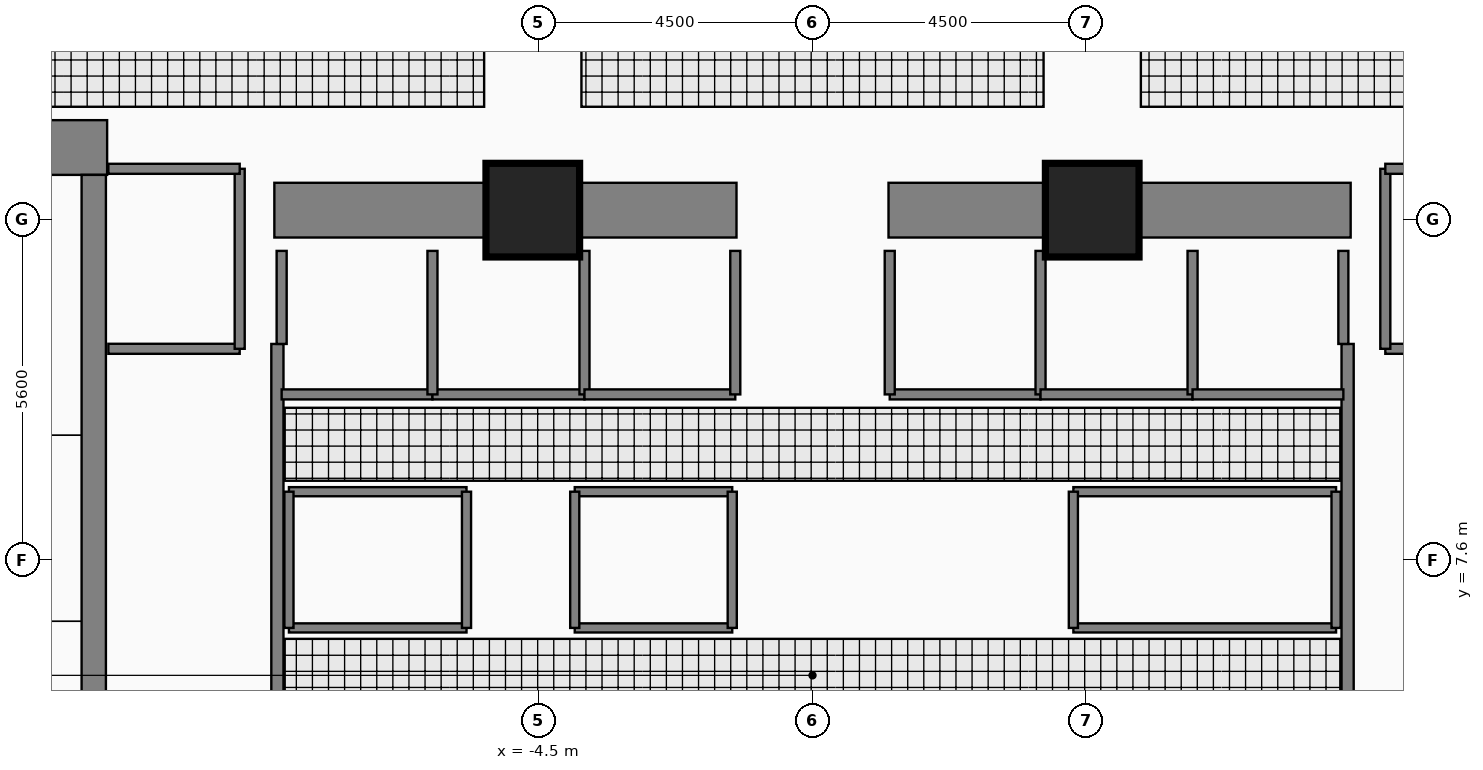
"""IFC4 building model, lengths in metres.
Left out: names, types, materials, properties, quantities, classifications, styles, units other than length and angle.
Written with IfcOpenShell. Run it as: python <this file> out.ifc"""

import sys

from ifc_helpers import new_model, si_unit, direction, frame, frame_2d, origin, origin_2d, place, context, subcontext, project, spatial, rectangle, extrude, element, fill, save


model = new_model("IFC4")
c1 = context("Model", 3, precision=1e-05, world=origin(), true_north=direction((0.0, 1.0)))
c2 = subcontext(c1, "Body", "Model", "MODEL_VIEW")
j1 = project(units=[si_unit("LENGTHUNIT", "METRE"), si_unit("PLANEANGLEUNIT", "RADIAN")], contexts=[c1])
p1 = place(None, origin())
s1 = spatial("IfcSite", under=j1, at=p1, CompositionType="ELEMENT")
p2 = place(p1, origin())
s2 = spatial("IfcBuilding", under=s1, at=p2, CompositionType="ELEMENT")
p3 = place(p2, frame((0.0, 0.0, 27.6)))
s3 = spatial("IfcBuildingStorey", under=s2, at=p3, CompositionType="ELEMENT", Elevation=27.6)
p4 = place(p3, frame((-16.31, 14.38, 0.0), z_axis=(0.0, 0.0, 1.0), x_axis=(1.0, 0.0, 0.0)))
e1 = element("IfcWall", 1, at=p4, inside=s3, PredefinedType="SHEAR", context=c2, shape_type="SweptSolid", body=[
    extrude(rectangle(XDim=4.71, YDim=0.9, at=frame_2d((2.355, 0.0))), origin(), (0.0, 0.0, 1.0), 3.46),
])
for number, where, z_axis, x_axis in (
    (2, (-8.85, 13.35, 0.0), (0.0, 0.0, 1.0), (1.0, 0.0, 0.0)),
    (3, (1.25, 13.35, 0.0), (0.0, 0.0, 1.0), (1.0, 0.0, 0.0)),
):
    element("IfcWall", number, at=place(p3, frame(where, z_axis=z_axis, x_axis=x_axis)), inside=s3, PredefinedType="SHEAR", context=c2, shape_type="SweptSolid", body=[
        extrude(rectangle(XDim=7.6, YDim=0.9, at=frame_2d((3.8, 0.0))), origin(), (0.0, 0.0, 1.0), 3.43),
    ])
p5 = place(p3, frame((-11.82, 4.97, 0.0), z_axis=(0.0, 0.0, 1.0), x_axis=(0.0, 1.0, 0.0)))
e4 = element("IfcWall", 4, at=p5, inside=s3, PredefinedType="SHEAR", context=c2, shape_type="SweptSolid", body=[
    extrude(rectangle(XDim=8.96, YDim=0.4, at=frame_2d((4.48, 0.0))), origin(), (0.0, 0.0, 1.0), 3.46),
])
p6 = place(p5, frame((0.31, 0.0, 0.0)))
e5 = element("IfcOpeningElement", 5, at=p6, cuts=e4, PredefinedType="OPENING", context=c2, shape_type="SweptSolid", body=[
    extrude(rectangle(XDim=1.12, YDim=2.22, at=frame_2d((0.56, 1.11))), frame((0.0, 0.21, 0.0), z_axis=(0.0, -1.0, 0.0), x_axis=(1.0, 0.0, 0.0)), (0.0, 0.0, 1.0), 0.42),
])
for number, where, z_axis, x_axis in (
    (6, (-4.6, 13.35, 0.0), (0.0, 0.0, 1.0), (1.0, 0.0, 0.0)),
    (7, (4.6, 13.35, 0.0), (0.0, 0.0, 1.0), (1.0, 0.0, 0.0)),
):
    element("IfcColumn", number, at=place(p3, frame(where, z_axis=z_axis, x_axis=x_axis)), inside=s3, PredefinedType="COLUMN", context=c2, shape_type="SweptSolid", body=[
        extrude(rectangle(XDim=1.5, YDim=1.5, at=origin_2d()), origin(), (0.0, 0.0, 1.0), 3.65),
    ])
p7 = place(p3, frame((-8.8, 5.05, 0.0), z_axis=(0.0, 0.0, 1.0), x_axis=(0.0, 1.0, 0.0)))
e8 = element("IfcWall", 8, at=p7, inside=s3, PredefinedType="PARTITIONING", context=c2, shape_type="SweptSolid", body=[
    extrude(rectangle(XDim=6.1, YDim=0.2, at=frame_2d((3.05, 0.0))), origin(), (0.0, 0.0, 1.0), 3.43),
])
p8 = place(p7, frame((0.25, 0.0, 0.0)))
e9 = element("IfcOpeningElement", 9, at=p8, cuts=e8, PredefinedType="OPENING", context=c2, shape_type="SweptSolid", body=[
    extrude(rectangle(XDim=1.1, YDim=2.2, at=frame_2d((0.55, 1.1))), frame((0.0, 0.11, 0.0), z_axis=(0.0, -1.0, 0.0), x_axis=(1.0, 0.0, 0.0)), (0.0, 0.0, 1.0), 0.22),
])
p9 = place(p7, frame((3.85, 0.0, 0.0)))
e10 = element("IfcOpeningElement", 10, at=p9, cuts=e8, PredefinedType="OPENING", context=c2, shape_type="SweptSolid", body=[
    extrude(rectangle(XDim=1.1, YDim=2.2, at=frame_2d((0.55, 1.1))), frame((0.0, 0.11, 0.0), z_axis=(0.0, -1.0, 0.0), x_axis=(1.0, 0.0, 0.0)), (0.0, 0.0, 1.0), 0.22),
])
p10 = place(p3, frame((8.8, 11.15, 0.0), z_axis=(0.0, 0.0, 1.0), x_axis=(0.0, -1.0, 0.0)))
e11 = element("IfcWall", 11, at=p10, inside=s3, PredefinedType="PARTITIONING", context=c2, shape_type="SweptSolid", body=[
    extrude(rectangle(XDim=6.1, YDim=0.2, at=frame_2d((3.05, 0.0))), origin(), (0.0, 0.0, 1.0), 3.43),
])
p11 = place(p10, frame((1.15, 0.0, 0.0)))
e12 = element("IfcOpeningElement", 12, at=p11, cuts=e11, PredefinedType="OPENING", context=c2, shape_type="SweptSolid", body=[
    extrude(rectangle(XDim=1.1, YDim=2.2, at=frame_2d((0.55, 1.1))), frame((0.0, 0.11, 0.0), z_axis=(0.0, -1.0, 0.0), x_axis=(1.0, 0.0, 0.0)), (0.0, 0.0, 1.0), 0.22),
])
p12 = place(p10, frame((4.75, 0.0, 0.0)))
e13 = element("IfcOpeningElement", 13, at=p12, cuts=e11, PredefinedType="OPENING", context=c2, shape_type="SweptSolid", body=[
    extrude(rectangle(XDim=1.1, YDim=2.2, at=frame_2d((0.55, 1.1))), frame((0.0, 0.11, 0.0), z_axis=(0.0, -1.0, 0.0), x_axis=(1.0, 0.0, 0.0)), (0.0, 0.0, 1.0), 0.22),
])
p13 = place(p3, frame((-11.58, 11.07, 0.0), z_axis=(0.0, 0.0, 1.0), x_axis=(1.0, 0.0, 0.0)))
e14 = element("IfcWall", 14, at=p13, inside=s3, PredefinedType="PARTITIONING", context=c2, shape_type="SweptSolid", body=[
    extrude(rectangle(XDim=2.16, YDim=0.165, at=frame_2d((1.08, 0.0))), origin(), (0.0, 0.0, 1.0), 3.43),
])
p14 = place(p13, frame((0.53, 0.0, 0.0)))
e15 = element("IfcOpeningElement", 15, at=p14, cuts=e14, PredefinedType="OPENING", context=c2, shape_type="SweptSolid", body=[
    extrude(rectangle(XDim=1.15, YDim=2.25, at=frame_2d((0.575, 1.125))), frame((0.0, 0.093, 0.0), z_axis=(0.0, -1.0, 0.0), x_axis=(1.0, 0.0, 0.0)), (0.0, 0.0, 1.0), 0.185),
])
p15 = place(p3, frame((9.42, 11.07, 0.0), z_axis=(0.0, 0.0, 1.0), x_axis=(1.0, 0.0, 0.0)))
e16 = element("IfcWall", 16, at=p15, inside=s3, PredefinedType="PARTITIONING", context=c2, shape_type="SweptSolid", body=[
    extrude(rectangle(XDim=2.16, YDim=0.165, at=frame_2d((1.08, 0.0))), origin(), (0.0, 0.0, 1.0), 3.43),
])
p16 = place(p15, frame((0.53, 0.0, 0.0)))
e17 = element("IfcOpeningElement", 17, at=p16, cuts=e16, PredefinedType="OPENING", context=c2, shape_type="SweptSolid", body=[
    extrude(rectangle(XDim=1.15, YDim=2.25, at=frame_2d((0.575, 1.125))), frame((0.0, 0.093, 0.0), z_axis=(0.0, -1.0, 0.0), x_axis=(1.0, 0.0, 0.0)), (0.0, 0.0, 1.0), 0.185),
])
p17 = place(p3, frame((-8.73, 10.32, 0.0), z_axis=(0.0, 0.0, 1.0), x_axis=(1.0, 0.0, 0.0)))
e18 = element("IfcWall", 18, at=p17, inside=s3, PredefinedType="PARTITIONING", context=c2, shape_type="SweptSolid", body=[
    extrude(rectangle(XDim=2.48, YDim=0.165, at=frame_2d((1.24, 0.0))), origin(), (0.0, 0.0, 1.0), 3.43),
])
p18 = place(p17, frame((0.69, 0.0, 0.0)))
e19 = element("IfcOpeningElement", 19, at=p18, cuts=e18, PredefinedType="OPENING", context=c2, shape_type="SweptSolid", body=[
    extrude(rectangle(XDim=1.1, YDim=2.25, at=frame_2d((0.55, 1.125))), frame((0.0, 0.093, 0.0), z_axis=(0.0, -1.0, 0.0), x_axis=(1.0, 0.0, 0.0)), (0.0, 0.0, 1.0), 0.185),
])
p19 = place(p3, frame((-6.25, 10.32, 0.0), z_axis=(0.0, 0.0, 1.0), x_axis=(1.0, 0.0, 0.0)))
e20 = element("IfcWall", 20, at=p19, inside=s3, PredefinedType="PARTITIONING", context=c2, shape_type="SweptSolid", body=[
    extrude(rectangle(XDim=2.5, YDim=0.165, at=frame_2d((1.25, 0.0))), origin(), (0.0, 0.0, 1.0), 3.43),
])
p20 = place(p19, frame((0.7, 0.0, 0.0)))
e21 = element("IfcOpeningElement", 21, at=p20, cuts=e20, PredefinedType="OPENING", context=c2, shape_type="SweptSolid", body=[
    extrude(rectangle(XDim=1.1, YDim=2.25, at=frame_2d((0.55, 1.125))), frame((0.0, 0.093, 0.0), z_axis=(0.0, -1.0, 0.0), x_axis=(1.0, 0.0, 0.0)), (0.0, 0.0, 1.0), 0.185),
])
p21 = place(p3, frame((-8.61, 8.72, 0.0), z_axis=(0.0, 0.0, 1.0), x_axis=(1.0, 0.0, 0.0)))
e22 = element("IfcWall", 22, at=p21, inside=s3, PredefinedType="PARTITIONING", context=c2, shape_type="SweptSolid", body=[
    extrude(rectangle(XDim=2.92, YDim=0.15, at=frame_2d((1.46, 0.0))), origin(), (0.0, 0.0, 1.0), 3.43),
])
p22 = place(p21, frame((1.01, 0.0, 0.0)))
e23 = element("IfcOpeningElement", 23, at=p22, cuts=e22, PredefinedType="OPENING", context=c2, shape_type="SweptSolid", body=[
    extrude(rectangle(XDim=0.9, YDim=2.15, at=frame_2d((0.45, 1.075))), frame((0.0, 0.085, 0.0), z_axis=(0.0, -1.0, 0.0), x_axis=(1.0, 0.0, 0.0)), (0.0, 0.0, 1.0), 0.17),
])
p23 = place(p3, frame((-3.91, 6.48, 0.0), z_axis=(0.0, 0.0, 1.0), x_axis=(1.0, 0.0, 0.0)))
e24 = element("IfcWall", 24, at=p23, inside=s3, PredefinedType="PARTITIONING", context=c2, shape_type="SweptSolid", body=[
    extrude(rectangle(XDim=2.59, YDim=0.15, at=frame_2d((1.295, 0.0))), origin(), (0.0, 0.0, 1.0), 3.43),
])
p24 = place(p23, frame((0.845, 0.0, 0.0)))
e25 = element("IfcOpeningElement", 25, at=p24, cuts=e24, PredefinedType="OPENING", context=c2, shape_type="SweptSolid", body=[
    extrude(rectangle(XDim=0.9, YDim=2.15, at=frame_2d((0.45, 1.075))), frame((0.0, 0.085, 0.0), z_axis=(0.0, -1.0, 0.0), x_axis=(1.0, 0.0, 0.0)), (0.0, 0.0, 1.0), 0.17),
])
p25 = place(p3, frame((4.29, 6.48, 0.0), z_axis=(0.0, 0.0, 1.0), x_axis=(1.0, 0.0, 0.0)))
e26 = element("IfcWall", 26, at=p25, inside=s3, PredefinedType="PARTITIONING", context=c2, shape_type="SweptSolid", body=[
    extrude(rectangle(XDim=4.32, YDim=0.15, at=frame_2d((2.16, 0.0))), origin(), (0.0, 0.0, 1.0), 3.43),
])
p26 = place(p25, frame((1.71, 0.0, 0.0)))
e27 = element("IfcOpeningElement", 27, at=p26, cuts=e26, PredefinedType="OPENING", context=c2, shape_type="SweptSolid", body=[
    extrude(rectangle(XDim=0.9, YDim=2.15, at=frame_2d((0.45, 1.075))), frame((0.0, 0.085, 0.0), z_axis=(0.0, -1.0, 0.0), x_axis=(1.0, 0.0, 0.0)), (0.0, 0.0, 1.0), 0.17),
])
p27 = place(p3, frame((-9.42, 11.07, 0.0), z_axis=(0.0, 0.0, 1.0), x_axis=(0.0, 1.0, 0.0)))
e28 = element("IfcWall", 28, at=p27, inside=s3, PredefinedType="PARTITIONING", context=c2, shape_type="SweptSolid", body=[
    extrude(rectangle(XDim=2.96, YDim=0.165, at=frame_2d((1.48, 0.0))), origin(), (0.0, 0.0, 1.0), 3.43),
])
p28 = place(p3, frame((-11.58, 14.03, 0.0), z_axis=(0.0, 0.0, 1.0), x_axis=(1.0, 0.0, 0.0)))
e29 = element("IfcWall", 29, at=p28, inside=s3, PredefinedType="PARTITIONING", context=c2, shape_type="SweptSolid", body=[
    extrude(rectangle(XDim=2.16, YDim=0.165, at=frame_2d((1.08, 0.0))), origin(), (0.0, 0.0, 1.0), 3.43),
])
p29 = place(p3, frame((9.42, 11.07, 0.0), z_axis=(0.0, 0.0, 1.0), x_axis=(0.0, 1.0, 0.0)))
e30 = element("IfcWall", 30, at=p29, inside=s3, PredefinedType="PARTITIONING", context=c2, shape_type="SweptSolid", body=[
    extrude(rectangle(XDim=2.96, YDim=0.165, at=frame_2d((1.48, 0.0))), origin(), (0.0, 0.0, 1.0), 3.43),
])
p30 = place(p3, frame((9.42, 14.03, 0.0), z_axis=(0.0, 0.0, 1.0), x_axis=(1.0, 0.0, 0.0)))
e31 = element("IfcWall", 31, at=p30, inside=s3, PredefinedType="PARTITIONING", context=c2, shape_type="SweptSolid", body=[
    extrude(rectangle(XDim=2.16, YDim=0.165, at=frame_2d((1.08, 0.0))), origin(), (0.0, 0.0, 1.0), 3.43),
])
p31 = place(p3, frame((-8.73, 11.15, 0.0), z_axis=(0.0, 0.0, 1.0), x_axis=(0.0, 1.0, 0.0)))
e32 = element("IfcWall", 32, at=p31, inside=s3, PredefinedType="PARTITIONING", context=c2, shape_type="SweptSolid", body=[
    extrude(rectangle(XDim=1.53, YDim=0.165, at=frame_2d((0.765, 0.0))), origin(), (0.0, 0.0, 1.0), 3.43),
])
for number, where, z_axis, x_axis in (
    (33, (-6.25, 10.32, 0.0), (0.0, 0.0, 1.0), (0.0, 1.0, 0.0)),
    (34, (-3.75, 10.32, 0.0), (0.0, 0.0, 1.0), (0.0, 1.0, 0.0)),
):
    element("IfcWall", number, at=place(p3, frame(where, z_axis=z_axis, x_axis=x_axis)), inside=s3, PredefinedType="PARTITIONING", context=c2, shape_type="SweptSolid", body=[
        extrude(rectangle(XDim=2.36, YDim=0.165, at=frame_2d((1.18, 0.0))), origin(), (0.0, 0.0, 1.0), 3.43),
    ])
p32 = place(p3, frame((-3.75, 10.32, 0.0), z_axis=(0.0, 0.0, 1.0), x_axis=(1.0, 0.0, 0.0)))
e35 = element("IfcWall", 35, at=p32, inside=s3, PredefinedType="PARTITIONING", context=c2, shape_type="SweptSolid", body=[
    extrude(rectangle(XDim=2.48, YDim=0.165, at=frame_2d((1.24, 0.0))), origin(), (0.0, 0.0, 1.0), 3.43),
])
p33 = place(p3, frame((-1.27, 10.32, 0.0), z_axis=(0.0, 0.0, 1.0), x_axis=(0.0, 1.0, 0.0)))
e36 = element("IfcWall", 36, at=p33, inside=s3, PredefinedType="PARTITIONING", context=c2, shape_type="SweptSolid", body=[
    extrude(rectangle(XDim=2.36, YDim=0.165, at=frame_2d((1.18, 0.0))), origin(), (0.0, 0.0, 1.0), 3.43),
])
p34 = place(p3, frame((1.27, 10.32, 0.0), z_axis=(0.0, 0.0, 1.0), x_axis=(1.0, 0.0, 0.0)))
e37 = element("IfcWall", 37, at=p34, inside=s3, PredefinedType="PARTITIONING", context=c2, shape_type="SweptSolid", body=[
    extrude(rectangle(XDim=2.48, YDim=0.165, at=frame_2d((1.24, 0.0))), origin(), (0.0, 0.0, 1.0), 3.43),
])
for number, where, z_axis, x_axis in (
    (38, (1.27, 10.32, 0.0), (0.0, 0.0, 1.0), (0.0, 1.0, 0.0)),
    (39, (3.75, 10.32, 0.0), (0.0, 0.0, 1.0), (0.0, 1.0, 0.0)),
):
    element("IfcWall", number, at=place(p3, frame(where, z_axis=z_axis, x_axis=x_axis)), inside=s3, PredefinedType="PARTITIONING", context=c2, shape_type="SweptSolid", body=[
        extrude(rectangle(XDim=2.36, YDim=0.165, at=frame_2d((1.18, 0.0))), origin(), (0.0, 0.0, 1.0), 3.43),
    ])
p35 = place(p3, frame((3.75, 10.32, 0.0), z_axis=(0.0, 0.0, 1.0), x_axis=(1.0, 0.0, 0.0)))
e40 = element("IfcWall", 40, at=p35, inside=s3, PredefinedType="PARTITIONING", context=c2, shape_type="SweptSolid", body=[
    extrude(rectangle(XDim=2.5, YDim=0.165, at=frame_2d((1.25, 0.0))), origin(), (0.0, 0.0, 1.0), 3.43),
])
p36 = place(p3, frame((6.25, 10.32, 0.0), z_axis=(0.0, 0.0, 1.0), x_axis=(0.0, 1.0, 0.0)))
e41 = element("IfcWall", 41, at=p36, inside=s3, PredefinedType="PARTITIONING", context=c2, shape_type="SweptSolid", body=[
    extrude(rectangle(XDim=2.36, YDim=0.165, at=frame_2d((1.18, 0.0))), origin(), (0.0, 0.0, 1.0), 3.43),
])
p37 = place(p3, frame((6.25, 10.32, 0.0), z_axis=(0.0, 0.0, 1.0), x_axis=(1.0, 0.0, 0.0)))
e42 = element("IfcWall", 42, at=p37, inside=s3, PredefinedType="PARTITIONING", context=c2, shape_type="SweptSolid", body=[
    extrude(rectangle(XDim=2.48, YDim=0.165, at=frame_2d((1.24, 0.0))), origin(), (0.0, 0.0, 1.0), 3.43),
])
p38 = place(p3, frame((8.73, 11.15, 0.0), z_axis=(0.0, 0.0, 1.0), x_axis=(0.0, 1.0, 0.0)))
e43 = element("IfcWall", 43, at=p38, inside=s3, PredefinedType="PARTITIONING", context=c2, shape_type="SweptSolid", body=[
    extrude(rectangle(XDim=1.53, YDim=0.165, at=frame_2d((0.765, 0.0))), origin(), (0.0, 0.0, 1.0), 3.43),
])
p39 = place(p3, frame((-8.61, 6.48, 0.0), z_axis=(0.0, 0.0, 1.0), x_axis=(1.0, 0.0, 0.0)))
e44 = element("IfcWall", 44, at=p39, inside=s3, PredefinedType="PARTITIONING", context=c2, shape_type="SweptSolid", body=[
    extrude(rectangle(XDim=2.92, YDim=0.15, at=frame_2d((1.46, 0.0))), origin(), (0.0, 0.0, 1.0), 3.43),
])
for number, where, z_axis, x_axis in (
    (45, (-8.61, 6.48, 0.0), (0.0, 0.0, 1.0), (0.0, 1.0, 0.0)),
    (46, (-5.69, 6.48, 0.0), (0.0, 0.0, 1.0), (0.0, 1.0, 0.0)),
):
    element("IfcWall", number, at=place(p3, frame(where, z_axis=z_axis, x_axis=x_axis)), inside=s3, PredefinedType="PARTITIONING", context=c2, shape_type="SweptSolid", body=[
        extrude(rectangle(XDim=2.24, YDim=0.15, at=frame_2d((1.12, 0.0))), origin(), (0.0, 0.0, 1.0), 3.43),
    ])
p40 = place(p3, frame((-3.91, 8.72, 0.0), z_axis=(0.0, 0.0, 1.0), x_axis=(1.0, 0.0, 0.0)))
e47 = element("IfcWall", 47, at=p40, inside=s3, PredefinedType="PARTITIONING", context=c2, shape_type="SweptSolid", body=[
    extrude(rectangle(XDim=2.59, YDim=0.15, at=frame_2d((1.295, 0.0))), origin(), (0.0, 0.0, 1.0), 3.43),
])
for number, where, z_axis, x_axis in (
    (48, (-3.91, 6.48, 0.0), (0.0, 0.0, 1.0), (0.0, 1.0, 0.0)),
    (49, (-1.32, 6.48, 0.0), (0.0, 0.0, 1.0), (0.0, 1.0, 0.0)),
):
    element("IfcWall", number, at=place(p3, frame(where, z_axis=z_axis, x_axis=x_axis)), inside=s3, PredefinedType="PARTITIONING", context=c2, shape_type="SweptSolid", body=[
        extrude(rectangle(XDim=2.24, YDim=0.15, at=frame_2d((1.12, 0.0))), origin(), (0.0, 0.0, 1.0), 3.43),
    ])
p41 = place(p3, frame((4.29, 8.72, 0.0), z_axis=(0.0, 0.0, 1.0), x_axis=(1.0, 0.0, 0.0)))
e50 = element("IfcWall", 50, at=p41, inside=s3, PredefinedType="PARTITIONING", context=c2, shape_type="SweptSolid", body=[
    extrude(rectangle(XDim=4.32, YDim=0.15, at=frame_2d((2.16, 0.0))), origin(), (0.0, 0.0, 1.0), 3.43),
])
for number, where, z_axis, x_axis in (
    (51, (4.29, 6.48, 0.0), (0.0, 0.0, 1.0), (0.0, 1.0, 0.0)),
    (52, (8.61, 6.48, 0.0), (0.0, 0.0, 1.0), (0.0, 1.0, 0.0)),
):
    element("IfcWall", number, at=place(p3, frame(where, z_axis=z_axis, x_axis=x_axis)), inside=s3, PredefinedType="PARTITIONING", context=c2, shape_type="SweptSolid", body=[
        extrude(rectangle(XDim=2.24, YDim=0.15, at=frame_2d((1.12, 0.0))), origin(), (0.0, 0.0, 1.0), 3.43),
    ])
p42 = place(p6, origin())
e53 = element("IfcDoor", 53, at=p42, inside=s3, OperationType="SINGLE_SWING_LEFT", PredefinedType="DOOR", context=c2, shape_type="SweptSolid", body=[
    extrude(rectangle(XDim=1.12, YDim=2.22, at=frame_2d((0.56, 1.11))), frame((0.0, 0.025, 0.0), z_axis=(0.0, -1.0, 0.0), x_axis=(1.0, 0.0, 0.0)), (0.0, 0.0, 1.0), 0.05),
])
fill(e5, e53)
p43 = place(p8, origin())
e54 = element("IfcDoor", 54, at=p43, inside=s3, OperationType="SINGLE_SWING_LEFT", PredefinedType="DOOR", context=c2, shape_type="SweptSolid", body=[
    extrude(rectangle(XDim=1.1, YDim=2.2, at=frame_2d((0.55, 1.1))), frame((0.0, 0.025, 0.0), z_axis=(0.0, -1.0, 0.0), x_axis=(1.0, 0.0, 0.0)), (0.0, 0.0, 1.0), 0.05),
])
fill(e9, e54)
p44 = place(p9, origin())
e55 = element("IfcDoor", 55, at=p44, inside=s3, OperationType="SINGLE_SWING_RIGHT", PredefinedType="DOOR", context=c2, shape_type="SweptSolid", body=[
    extrude(rectangle(XDim=1.1, YDim=2.2, at=frame_2d((0.55, 1.1))), frame((0.0, 0.025, 0.0), z_axis=(0.0, -1.0, 0.0), x_axis=(1.0, 0.0, 0.0)), (0.0, 0.0, 1.0), 0.05),
])
fill(e10, e55)
p45 = place(p11, origin())
e56 = element("IfcDoor", 56, at=p45, inside=s3, OperationType="SINGLE_SWING_LEFT", PredefinedType="DOOR", context=c2, shape_type="SweptSolid", body=[
    extrude(rectangle(XDim=1.1, YDim=2.2, at=frame_2d((0.55, 1.1))), frame((0.0, 0.025, 0.0), z_axis=(0.0, -1.0, 0.0), x_axis=(1.0, 0.0, 0.0)), (0.0, 0.0, 1.0), 0.05),
])
fill(e12, e56)
p46 = place(p12, origin())
e57 = element("IfcDoor", 57, at=p46, inside=s3, OperationType="SINGLE_SWING_RIGHT", PredefinedType="DOOR", context=c2, shape_type="SweptSolid", body=[
    extrude(rectangle(XDim=1.1, YDim=2.2, at=frame_2d((0.55, 1.1))), frame((0.0, 0.025, 0.0), z_axis=(0.0, -1.0, 0.0), x_axis=(1.0, 0.0, 0.0)), (0.0, 0.0, 1.0), 0.05),
])
fill(e13, e57)
p47 = place(p14, origin())
e58 = element("IfcDoor", 58, at=p47, inside=s3, OperationType="SLIDING_TO_LEFT", PredefinedType="DOOR", context=c2, shape_type="SweptSolid", body=[
    extrude(rectangle(XDim=1.15, YDim=2.25, at=frame_2d((0.575, 1.125))), frame((0.0, 0.025, 0.0), z_axis=(0.0, -1.0, 0.0), x_axis=(1.0, 0.0, 0.0)), (0.0, 0.0, 1.0), 0.05),
])
fill(e15, e58)
p48 = place(p18, origin())
e59 = element("IfcDoor", 59, at=p48, inside=s3, OperationType="SLIDING_TO_LEFT", PredefinedType="DOOR", context=c2, shape_type="SweptSolid", body=[
    extrude(rectangle(XDim=1.1, YDim=2.25, at=frame_2d((0.55, 1.125))), frame((0.0, 0.025, 0.0), z_axis=(0.0, -1.0, 0.0), x_axis=(1.0, 0.0, 0.0)), (0.0, 0.0, 1.0), 0.05),
])
fill(e19, e59)
p49 = place(p20, origin())
e60 = element("IfcDoor", 60, at=p49, inside=s3, OperationType="SLIDING_TO_LEFT", PredefinedType="DOOR", context=c2, shape_type="SweptSolid", body=[
    extrude(rectangle(XDim=1.1, YDim=2.25, at=frame_2d((0.55, 1.125))), frame((0.0, 0.025, 0.0), z_axis=(0.0, -1.0, 0.0), x_axis=(1.0, 0.0, 0.0)), (0.0, 0.0, 1.0), 0.05),
])
fill(e21, e60)
p50 = place(p22, origin())
e61 = element("IfcDoor", 61, at=p50, inside=s3, OperationType="SINGLE_SWING_LEFT", PredefinedType="DOOR", context=c2, shape_type="SweptSolid", body=[
    extrude(rectangle(XDim=0.9, YDim=2.15, at=frame_2d((0.45, 1.075))), frame((0.0, 0.025, 0.0), z_axis=(0.0, -1.0, 0.0), x_axis=(1.0, 0.0, 0.0)), (0.0, 0.0, 1.0), 0.05),
])
fill(e23, e61)
p51 = place(p24, origin())
e62 = element("IfcDoor", 62, at=p51, inside=s3, OperationType="SINGLE_SWING_RIGHT", PredefinedType="DOOR", context=c2, shape_type="SweptSolid", body=[
    extrude(rectangle(XDim=0.9, YDim=2.15, at=frame_2d((0.45, 1.075))), frame((0.0, 0.025, 0.0), z_axis=(0.0, -1.0, 0.0), x_axis=(1.0, 0.0, 0.0)), (0.0, 0.0, 1.0), 0.05),
])
fill(e25, e62)
p52 = place(p26, origin())
e63 = element("IfcDoor", 63, at=p52, inside=s3, OperationType="SINGLE_SWING_LEFT", PredefinedType="DOOR", context=c2, shape_type="SweptSolid", body=[
    extrude(rectangle(XDim=0.9, YDim=2.15, at=frame_2d((0.45, 1.075))), frame((0.0, 0.025, 0.0), z_axis=(0.0, -1.0, 0.0), x_axis=(1.0, 0.0, 0.0)), (0.0, 0.0, 1.0), 0.05),
])
fill(e27, e63)
save(model, sys.argv[1])
